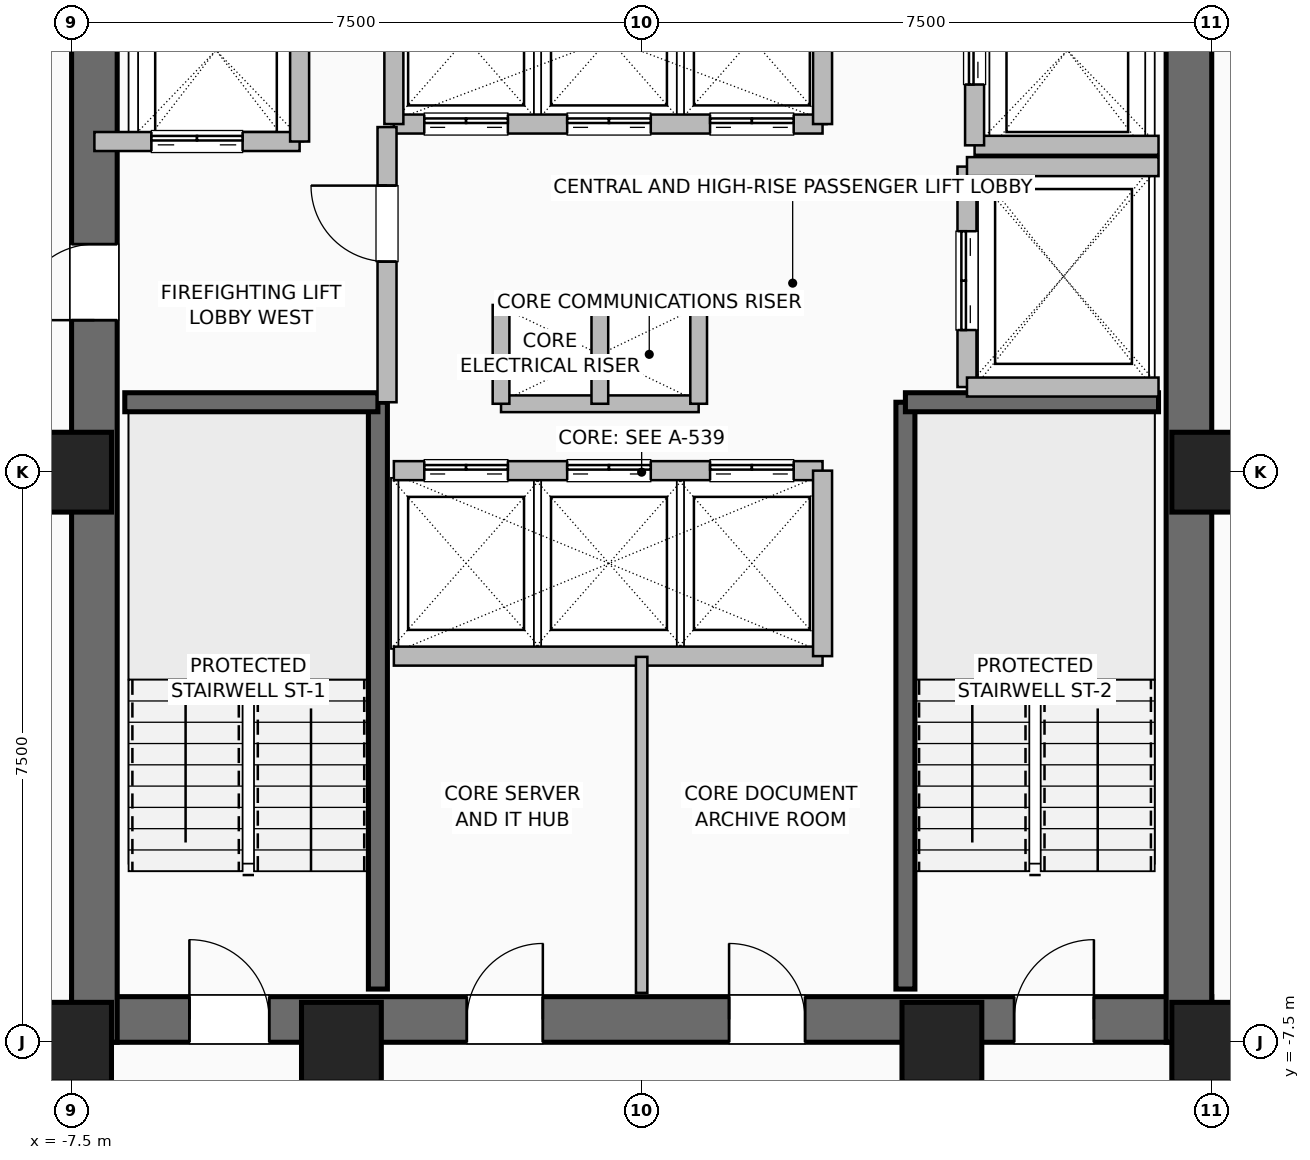
"""IFC4 building model, lengths in metres.
Left out: names, types, materials, properties, quantities, classifications, styles, units other than length and angle.
Written with IfcOpenShell. Run it as: python <this file> out.ifc"""

import sys

from ifc_helpers import new_model, si_unit, direction, frame, frame_2d, origin, origin_2d, place, context, subcontext, project, spatial, rectangle, hollow_rectangle, extrude, element, fill, save


model = new_model("IFC4")
c1 = context("Model", 3, precision=1e-05, world=origin(), true_north=direction((0.0, 1.0)))
c2 = subcontext(c1, "Body", "Model", "MODEL_VIEW")
j1 = project(units=[si_unit("LENGTHUNIT", "METRE"), si_unit("PLANEANGLEUNIT", "RADIAN")], contexts=[c1])
p1 = place(None, origin())
s1 = spatial("IfcSite", under=j1, at=p1, CompositionType="ELEMENT")
p2 = place(p1, origin())
s2 = spatial("IfcBuilding", under=s1, at=p2, CompositionType="ELEMENT")
p3 = place(p2, frame((0.0, 0.0, 148.0)))
s3 = spatial("IfcBuildingStorey", under=s2, at=p3, CompositionType="ELEMENT", Elevation=148.0)
for number, where, z_axis, x_axis in (
    (1, (-7.5, -7.5, 0.0), (0.0, 0.0, 1.0), (1.0, 0.0, 0.0)),
    (2, (-3.95, -7.5, 0.0), (0.0, 0.0, 1.0), (1.0, 0.0, 0.0)),
    (3, (3.95, -7.5, 0.0), (0.0, 0.0, 1.0), (1.0, 0.0, 0.0)),
    (4, (7.5, -7.5, 0.0), (0.0, 0.0, 1.0), (1.0, 0.0, 0.0)),
    (5, (7.5, 0.0, 0.0), (0.0, 0.0, 1.0), (1.0, 0.0, 0.0)),
    (6, (-7.5, 0.0, 0.0), (0.0, 0.0, 1.0), (1.0, 0.0, 0.0)),
):
    element("IfcColumn", number, at=place(p3, frame(where, z_axis=z_axis, x_axis=x_axis)), inside=s3, PredefinedType="COLUMN", context=c2, shape_type="SweptSolid", body=[
        extrude(hollow_rectangle(XDim=1.05, YDim=1.05, WallThickness=0.05, at=origin_2d()), origin(), (0.0, 0.0, 1.0), 3.6),
    ])
p4 = place(p3, frame((-7.5, -7.2, 0.0), z_axis=(0.0, 0.0, 1.0), x_axis=(1.0, 0.0, 0.0)))
e7 = element("IfcWall", 7, at=p4, inside=s3, PredefinedType="SHEAR", context=c2, shape_type="SweptSolid", body=[
    extrude(rectangle(XDim=15.0, YDim=0.6, at=frame_2d((7.5, 0.0))), origin(), (0.0, 0.0, 1.0), 3.36),
])
p5 = place(p4, frame((1.55, 0.0, 0.0)))
e8 = element("IfcOpeningElement", 8, at=p5, cuts=e7, PredefinedType="OPENING", context=c2, shape_type="SweptSolid", body=[
    extrude(rectangle(XDim=1.05, YDim=2.08, at=frame_2d((0.525, 1.04))), frame((0.0, 0.31, 0.0), z_axis=(0.0, -1.0, 0.0), x_axis=(1.0, 0.0, 0.0)), (0.0, 0.0, 1.0), 0.62),
])
p6 = place(p4, frame((12.4, 0.0, 0.0)))
e9 = element("IfcOpeningElement", 9, at=p6, cuts=e7, PredefinedType="OPENING", context=c2, shape_type="SweptSolid", body=[
    extrude(rectangle(XDim=1.05, YDim=2.08, at=frame_2d((0.525, 1.04))), frame((0.0, 0.31, 0.0), z_axis=(0.0, -1.0, 0.0), x_axis=(1.0, 0.0, 0.0)), (0.0, 0.0, 1.0), 0.62),
])
p7 = place(p4, frame((5.2, 0.0, 0.0)))
e10 = element("IfcOpeningElement", 10, at=p7, cuts=e7, PredefinedType="OPENING", context=c2, shape_type="SweptSolid", body=[
    extrude(rectangle(XDim=1.0, YDim=2.08, at=frame_2d((0.5, 1.04))), frame((0.0, 0.31, 0.0), z_axis=(0.0, -1.0, 0.0), x_axis=(1.0, 0.0, 0.0)), (0.0, 0.0, 1.0), 0.62),
])
p8 = place(p4, frame((8.65, 0.0, 0.0)))
e11 = element("IfcOpeningElement", 11, at=p8, cuts=e7, PredefinedType="OPENING", context=c2, shape_type="SweptSolid", body=[
    extrude(rectangle(XDim=1.0, YDim=2.08, at=frame_2d((0.5, 1.04))), frame((0.0, 0.31, 0.0), z_axis=(0.0, -1.0, 0.0), x_axis=(1.0, 0.0, 0.0)), (0.0, 0.0, 1.0), 0.62),
])
p9 = place(p3, frame((-7.2, -7.5, 0.0), z_axis=(0.0, 0.0, 1.0), x_axis=(0.0, 1.0, 0.0)))
e12 = element("IfcWall", 12, at=p9, inside=s3, PredefinedType="SHEAR", context=c2, shape_type="SweptSolid", body=[
    extrude(rectangle(XDim=15.0, YDim=0.6, at=frame_2d((7.5, 0.0))), origin(), (0.0, 0.0, 1.0), 3.36),
])
p10 = place(p9, frame((9.5, 0.0, 0.0)))
e13 = element("IfcOpeningElement", 13, at=p10, cuts=e12, PredefinedType="OPENING", context=c2, shape_type="SweptSolid", body=[
    extrude(rectangle(XDim=1.0, YDim=2.08, at=frame_2d((0.5, 1.04))), frame((0.0, 0.31, 0.0), z_axis=(0.0, -1.0, 0.0), x_axis=(1.0, 0.0, 0.0)), (0.0, 0.0, 1.0), 0.62),
])
p11 = place(p3, frame((7.2, -7.5, 0.0), z_axis=(0.0, 0.0, 1.0), x_axis=(0.0, 1.0, 0.0)))
e14 = element("IfcWall", 14, at=p11, inside=s3, PredefinedType="SHEAR", context=c2, shape_type="SweptSolid", body=[
    extrude(rectangle(XDim=15.0, YDim=0.6, at=frame_2d((7.5, 0.0))), origin(), (0.0, 0.0, 1.0), 3.36),
])
p12 = place(p3, frame((-3.47, -6.8, 0.0), z_axis=(0.0, 0.0, 1.0), x_axis=(0.0, 1.0, 0.0)))
e15 = element("IfcWall", 15, at=p12, inside=s3, PredefinedType="SHEAR", context=c2, shape_type="SweptSolid", body=[
    extrude(rectangle(XDim=7.72, YDim=0.25, at=frame_2d((3.86, 0.0))), origin(), (0.0, 0.0, 1.0), 3.36),
])
p13 = place(p3, frame((-6.8, 0.92, 0.0), z_axis=(0.0, 0.0, 1.0), x_axis=(1.0, 0.0, 0.0)))
e16 = element("IfcWall", 16, at=p13, inside=s3, PredefinedType="SHEAR", context=c2, shape_type="SweptSolid", body=[
    extrude(rectangle(XDim=3.33, YDim=0.25, at=frame_2d((1.665, 0.0))), origin(), (0.0, 0.0, 1.0), 3.36),
])
p14 = place(p3, frame((3.47, -6.8, 0.0), z_axis=(0.0, 0.0, 1.0), x_axis=(0.0, 1.0, 0.0)))
e17 = element("IfcWall", 17, at=p14, inside=s3, PredefinedType="SHEAR", context=c2, shape_type="SweptSolid", body=[
    extrude(rectangle(XDim=7.72, YDim=0.25, at=frame_2d((3.86, 0.0))), origin(), (0.0, 0.0, 1.0), 3.36),
])
p15 = place(p3, frame((3.47, 0.92, 0.0), z_axis=(0.0, 0.0, 1.0), x_axis=(1.0, 0.0, 0.0)))
e18 = element("IfcWall", 18, at=p15, inside=s3, PredefinedType="SHEAR", context=c2, shape_type="SweptSolid", body=[
    extrude(rectangle(XDim=3.33, YDim=0.25, at=frame_2d((1.665, 0.0))), origin(), (0.0, 0.0, 1.0), 3.36),
])
for number, where, z_axis, x_axis in (
    (19, (-1.85, 2.2, 0.0), (0.0, 0.0, 1.0), (1.0, 0.0, 0.0)),
    (20, (-1.85, 0.9, 0.0), (0.0, 0.0, 1.0), (1.0, 0.0, 0.0)),
):
    element("IfcWall", number, at=place(p3, frame(where, z_axis=z_axis, x_axis=x_axis)), inside=s3, PredefinedType="PARTITIONING", context=c2, shape_type="SweptSolid", body=[
        extrude(rectangle(XDim=2.6, YDim=0.22, at=frame_2d((1.3, 0.0))), origin(), (0.0, 0.0, 1.0), 3.36),
    ])
for number, where, z_axis, x_axis in (
    (21, (-0.55, 0.9, 0.0), (0.0, 0.0, 1.0), (0.0, 1.0, 0.0)),
    (22, (0.75, 0.9, 0.0), (0.0, 0.0, 1.0), (0.0, 1.0, 0.0)),
    (23, (-1.85, 0.9, 0.0), (0.0, 0.0, 1.0), (0.0, 1.0, 0.0)),
):
    element("IfcWall", number, at=place(p3, frame(where, z_axis=z_axis, x_axis=x_axis)), inside=s3, PredefinedType="PARTITIONING", context=c2, shape_type="SweptSolid", body=[
        extrude(rectangle(XDim=1.3, YDim=0.22, at=frame_2d((0.65, 0.0))), origin(), (0.0, 0.0, 1.0), 3.36),
    ])
p16 = place(p3, frame((-3.26, 0.02, 0.0), z_axis=(0.0, 0.0, 1.0), x_axis=(1.0, 0.0, 0.0)))
e24 = element("IfcWall", 24, at=p16, inside=s3, PredefinedType="SHEAR", context=c2, shape_type="SweptSolid", body=[
    extrude(rectangle(XDim=5.64, YDim=0.25, at=frame_2d((2.82, 0.0))), origin(), (0.0, 0.0, 1.0), 3.36),
])
p17 = place(p16, frame((0.4, 0.0, 0.0)))
e25 = element("IfcOpeningElement", 25, at=p17, cuts=e24, PredefinedType="OPENING", context=c2, shape_type="SweptSolid", body=[
    extrude(rectangle(XDim=1.1, YDim=2.2, at=frame_2d((0.55, 1.1))), frame((0.0, 0.135, 0.0), z_axis=(0.0, -1.0, 0.0), x_axis=(1.0, 0.0, 0.0)), (0.0, 0.0, 1.0), 0.27),
])
p18 = place(p16, frame((2.28, 0.0, 0.0)))
e26 = element("IfcOpeningElement", 26, at=p18, cuts=e24, PredefinedType="OPENING", context=c2, shape_type="SweptSolid", body=[
    extrude(rectangle(XDim=1.1, YDim=2.2, at=frame_2d((0.55, 1.1))), frame((0.0, 0.135, 0.0), z_axis=(0.0, -1.0, 0.0), x_axis=(1.0, 0.0, 0.0)), (0.0, 0.0, 1.0), 0.27),
])
p19 = place(p16, frame((4.16, 0.0, 0.0)))
e27 = element("IfcOpeningElement", 27, at=p19, cuts=e24, PredefinedType="OPENING", context=c2, shape_type="SweptSolid", body=[
    extrude(rectangle(XDim=1.1, YDim=2.2, at=frame_2d((0.55, 1.1))), frame((0.0, 0.135, 0.0), z_axis=(0.0, -1.0, 0.0), x_axis=(1.0, 0.0, 0.0)), (0.0, 0.0, 1.0), 0.27),
])
p20 = place(p3, frame((-3.26, -2.42, 0.0), z_axis=(0.0, 0.0, 1.0), x_axis=(1.0, 0.0, 0.0)))
e28 = element("IfcWall", 28, at=p20, inside=s3, PredefinedType="SHEAR", context=c2, shape_type="SweptSolid", body=[
    extrude(rectangle(XDim=5.64, YDim=0.25, at=frame_2d((2.82, 0.0))), origin(), (0.0, 0.0, 1.0), 3.36),
])
p21 = place(p3, frame((2.38, -2.42, 0.0), z_axis=(0.0, 0.0, 1.0), x_axis=(0.0, 1.0, 0.0)))
e29 = element("IfcWall", 29, at=p21, inside=s3, PredefinedType="SHEAR", context=c2, shape_type="SweptSolid", body=[
    extrude(rectangle(XDim=2.44, YDim=0.25, at=frame_2d((1.22, 0.0))), origin(), (0.0, 0.0, 1.0), 3.36),
])
p22 = place(p3, frame((-3.26, 4.58, 0.0), z_axis=(0.0, 0.0, 1.0), x_axis=(1.0, 0.0, 0.0)))
e30 = element("IfcWall", 30, at=p22, inside=s3, PredefinedType="SHEAR", context=c2, shape_type="SweptSolid", body=[
    extrude(rectangle(XDim=5.64, YDim=0.25, at=frame_2d((2.82, 0.0))), origin(), (0.0, 0.0, 1.0), 3.36),
])
p23 = place(p22, frame((0.4, 0.0, 0.0)))
e31 = element("IfcOpeningElement", 31, at=p23, cuts=e30, PredefinedType="OPENING", context=c2, shape_type="SweptSolid", body=[
    extrude(rectangle(XDim=1.1, YDim=2.2, at=frame_2d((0.55, 1.1))), frame((0.0, 0.135, 0.0), z_axis=(0.0, -1.0, 0.0), x_axis=(1.0, 0.0, 0.0)), (0.0, 0.0, 1.0), 0.27),
])
p24 = place(p22, frame((2.28, 0.0, 0.0)))
e32 = element("IfcOpeningElement", 32, at=p24, cuts=e30, PredefinedType="OPENING", context=c2, shape_type="SweptSolid", body=[
    extrude(rectangle(XDim=1.1, YDim=2.2, at=frame_2d((0.55, 1.1))), frame((0.0, 0.135, 0.0), z_axis=(0.0, -1.0, 0.0), x_axis=(1.0, 0.0, 0.0)), (0.0, 0.0, 1.0), 0.27),
])
p25 = place(p22, frame((4.16, 0.0, 0.0)))
e33 = element("IfcOpeningElement", 33, at=p25, cuts=e30, PredefinedType="OPENING", context=c2, shape_type="SweptSolid", body=[
    extrude(rectangle(XDim=1.1, YDim=2.2, at=frame_2d((0.55, 1.1))), frame((0.0, 0.135, 0.0), z_axis=(0.0, -1.0, 0.0), x_axis=(1.0, 0.0, 0.0)), (0.0, 0.0, 1.0), 0.27),
])
for number, where, z_axis, x_axis in (
    (34, (-3.26, 4.58, 0.0), (0.0, 0.0, 1.0), (0.0, 1.0, 0.0)),
    (35, (2.38, 4.58, 0.0), (0.0, 0.0, 1.0), (0.0, 1.0, 0.0)),
):
    element("IfcWall", number, at=place(p3, frame(where, z_axis=z_axis, x_axis=x_axis)), inside=s3, PredefinedType="SHEAR", context=c2, shape_type="SweptSolid", body=[
        extrude(rectangle(XDim=2.22, YDim=0.25, at=frame_2d((1.11, 0.0))), origin(), (0.0, 0.0, 1.0), 3.36),
    ])
p26 = place(p3, frame((-7.2, 4.35, 0.0), z_axis=(0.0, 0.0, 1.0), x_axis=(1.0, 0.0, 0.0)))
e36 = element("IfcWall", 36, at=p26, inside=s3, PredefinedType="SHEAR", context=c2, shape_type="SweptSolid", body=[
    extrude(rectangle(XDim=2.7, YDim=0.25, at=frame_2d((1.35, 0.0))), origin(), (0.0, 0.0, 1.0), 3.36),
])
p27 = place(p26, frame((0.75, 0.0, 0.0)))
e37 = element("IfcOpeningElement", 37, at=p27, cuts=e36, PredefinedType="OPENING", context=c2, shape_type="SweptSolid", body=[
    extrude(rectangle(XDim=1.2, YDim=2.2, at=frame_2d((0.6, 1.1))), frame((0.0, 0.135, 0.0), z_axis=(0.0, -1.0, 0.0), x_axis=(1.0, 0.0, 0.0)), (0.0, 0.0, 1.0), 0.27),
])
p28 = place(p3, frame((-4.5, 4.35, 0.0), z_axis=(0.0, 0.0, 1.0), x_axis=(0.0, 1.0, 0.0)))
e38 = element("IfcWall", 38, at=p28, inside=s3, PredefinedType="SHEAR", context=c2, shape_type="SweptSolid", body=[
    extrude(rectangle(XDim=2.85, YDim=0.25, at=frame_2d((1.425, 0.0))), origin(), (0.0, 0.0, 1.0), 3.36),
])
p29 = place(p3, frame((4.38, 4.3, 0.0), z_axis=(0.0, 0.0, 1.0), x_axis=(1.0, 0.0, 0.0)))
e39 = element("IfcWall", 39, at=p29, inside=s3, PredefinedType="SHEAR", context=c2, shape_type="SweptSolid", body=[
    extrude(rectangle(XDim=2.42, YDim=0.25, at=frame_2d((1.21, 0.0))), origin(), (0.0, 0.0, 1.0), 3.36),
])
p30 = place(p3, frame((4.38, 4.3, 0.0), z_axis=(0.0, 0.0, 1.0), x_axis=(0.0, 1.0, 0.0)))
e40 = element("IfcWall", 40, at=p30, inside=s3, PredefinedType="SHEAR", context=c2, shape_type="SweptSolid", body=[
    extrude(rectangle(XDim=2.5, YDim=0.25, at=frame_2d((1.25, 0.0))), origin(), (0.0, 0.0, 1.0), 3.36),
])
p31 = place(p30, frame((0.8, 0.0, 0.0)))
e41 = element("IfcOpeningElement", 41, at=p31, cuts=e40, PredefinedType="OPENING", context=c2, shape_type="SweptSolid", body=[
    extrude(rectangle(XDim=1.2, YDim=2.2, at=frame_2d((0.6, 1.1))), frame((0.0, 0.135, 0.0), z_axis=(0.0, -1.0, 0.0), x_axis=(1.0, 0.0, 0.0)), (0.0, 0.0, 1.0), 0.27),
])
p32 = place(p3, frame((4.28, 1.12, 0.0), z_axis=(0.0, 0.0, 1.0), x_axis=(0.0, 1.0, 0.0)))
e42 = element("IfcWall", 42, at=p32, inside=s3, PredefinedType="SHEAR", context=c2, shape_type="SweptSolid", body=[
    extrude(rectangle(XDim=2.9, YDim=0.25, at=frame_2d((1.45, 0.0))), origin(), (0.0, 0.0, 1.0), 3.36),
])
p33 = place(p32, frame((0.75, 0.0, 0.0)))
e43 = element("IfcOpeningElement", 43, at=p33, cuts=e42, PredefinedType="OPENING", context=c2, shape_type="SweptSolid", body=[
    extrude(rectangle(XDim=1.3, YDim=2.3, at=frame_2d((0.65, 1.15))), frame((0.0, 0.135, 0.0), z_axis=(0.0, -1.0, 0.0), x_axis=(1.0, 0.0, 0.0)), (0.0, 0.0, 1.0), 0.27),
])
for number, where, z_axis, x_axis in (
    (44, (4.28, 1.12, 0.0), (0.0, 0.0, 1.0), (1.0, 0.0, 0.0)),
    (45, (4.28, 4.02, 0.0), (0.0, 0.0, 1.0), (1.0, 0.0, 0.0)),
):
    element("IfcWall", number, at=place(p3, frame(where, z_axis=z_axis, x_axis=x_axis)), inside=s3, PredefinedType="SHEAR", context=c2, shape_type="SweptSolid", body=[
        extrude(rectangle(XDim=2.52, YDim=0.25, at=frame_2d((1.26, 0.0))), origin(), (0.0, 0.0, 1.0), 3.36),
    ])
p34 = place(p3, frame((-3.35, 0.92, 0.0), z_axis=(0.0, 0.0, 1.0), x_axis=(0.0, 1.0, 0.0)))
e46 = element("IfcWall", 46, at=p34, inside=s3, PredefinedType="SHEAR", context=c2, shape_type="SweptSolid", body=[
    extrude(rectangle(XDim=3.62, YDim=0.25, at=frame_2d((1.81, 0.0))), origin(), (0.0, 0.0, 1.0), 3.36),
])
p35 = place(p34, frame((1.85, 0.0, 0.0)))
e47 = element("IfcOpeningElement", 47, at=p35, cuts=e46, PredefinedType="OPENING", context=c2, shape_type="SweptSolid", body=[
    extrude(rectangle(XDim=1.0, YDim=2.08, at=frame_2d((0.5, 1.04))), frame((0.0, 0.135, 0.0), z_axis=(0.0, -1.0, 0.0), x_axis=(1.0, 0.0, 0.0)), (0.0, 0.0, 1.0), 0.27),
])
p36 = place(p3, frame((0.0, -6.85, 0.0), z_axis=(0.0, 0.0, 1.0), x_axis=(0.0, 1.0, 0.0)))
e48 = element("IfcWall", 48, at=p36, inside=s3, PredefinedType="PARTITIONING", context=c2, shape_type="SweptSolid", body=[
    extrude(rectangle(XDim=4.42, YDim=0.15, at=frame_2d((2.21, 0.0))), origin(), (0.0, 0.0, 1.0), 3.36),
])
p37 = place(p3, frame((7.45, -7.48, 0.0), z_axis=(0.0, 0.0, 1.0), x_axis=(1.0, 0.0, 0.0)))
e49 = element("IfcWall", 49, at=p37, inside=s3, PredefinedType="PARTITIONING", context=c2, shape_type="SweptSolid", body=[
    extrude(rectangle(XDim=0.95, YDim=0.15, at=frame_2d((0.475, 0.0))), origin(), (0.0, 0.0, 1.0), 3.36),
])
p38 = place(p5, origin())
e50 = element("IfcDoor", 50, at=p38, inside=s3, OperationType="SINGLE_SWING_LEFT", PredefinedType="DOOR", context=c2, shape_type="SweptSolid", body=[
    extrude(rectangle(XDim=1.05, YDim=2.08, at=frame_2d((0.525, 1.04))), frame((0.0, 0.025, 0.0), z_axis=(0.0, -1.0, 0.0), x_axis=(1.0, 0.0, 0.0)), (0.0, 0.0, 1.0), 0.05),
])
fill(e8, e50)
p39 = place(p6, origin())
e51 = element("IfcDoor", 51, at=p39, inside=s3, OperationType="SINGLE_SWING_RIGHT", PredefinedType="DOOR", context=c2, shape_type="SweptSolid", body=[
    extrude(rectangle(XDim=1.05, YDim=2.08, at=frame_2d((0.525, 1.04))), frame((0.0, 0.025, 0.0), z_axis=(0.0, -1.0, 0.0), x_axis=(1.0, 0.0, 0.0)), (0.0, 0.0, 1.0), 0.05),
])
fill(e9, e51)
p40 = place(p10, origin())
e52 = element("IfcDoor", 52, at=p40, inside=s3, OperationType="SINGLE_SWING_LEFT", PredefinedType="DOOR", context=c2, shape_type="SweptSolid", body=[
    extrude(rectangle(XDim=1.0, YDim=2.08, at=frame_2d((0.5, 1.04))), frame((0.0, 0.025, 0.0), z_axis=(0.0, -1.0, 0.0), x_axis=(1.0, 0.0, 0.0)), (0.0, 0.0, 1.0), 0.05),
])
fill(e13, e52)
p41 = place(p7, origin())
e53 = element("IfcDoor", 53, at=p41, inside=s3, OperationType="SINGLE_SWING_RIGHT", PredefinedType="DOOR", context=c2, shape_type="SweptSolid", body=[
    extrude(rectangle(XDim=1.0, YDim=2.08, at=frame_2d((0.5, 1.04))), frame((0.0, 0.025, 0.0), z_axis=(0.0, -1.0, 0.0), x_axis=(1.0, 0.0, 0.0)), (0.0, 0.0, 1.0), 0.05),
])
fill(e10, e53)
p42 = place(p8, origin())
e54 = element("IfcDoor", 54, at=p42, inside=s3, OperationType="SINGLE_SWING_LEFT", PredefinedType="DOOR", context=c2, shape_type="SweptSolid", body=[
    extrude(rectangle(XDim=1.0, YDim=2.08, at=frame_2d((0.5, 1.04))), frame((0.0, 0.025, 0.0), z_axis=(0.0, -1.0, 0.0), x_axis=(1.0, 0.0, 0.0)), (0.0, 0.0, 1.0), 0.05),
])
fill(e11, e54)
p43 = place(p17, origin())
e55 = element("IfcDoor", 55, at=p43, inside=s3, OperationType="DOUBLE_DOOR_SLIDING", PredefinedType="DOOR", context=c2, shape_type="SweptSolid", body=[
    extrude(rectangle(XDim=1.1, YDim=2.2, at=frame_2d((0.55, 1.1))), frame((0.0, 0.025, 0.0), z_axis=(0.0, -1.0, 0.0), x_axis=(1.0, 0.0, 0.0)), (0.0, 0.0, 1.0), 0.05),
])
fill(e25, e55)
p44 = place(p18, origin())
e56 = element("IfcDoor", 56, at=p44, inside=s3, OperationType="DOUBLE_DOOR_SLIDING", PredefinedType="DOOR", context=c2, shape_type="SweptSolid", body=[
    extrude(rectangle(XDim=1.1, YDim=2.2, at=frame_2d((0.55, 1.1))), frame((0.0, 0.025, 0.0), z_axis=(0.0, -1.0, 0.0), x_axis=(1.0, 0.0, 0.0)), (0.0, 0.0, 1.0), 0.05),
])
fill(e26, e56)
p45 = place(p19, origin())
e57 = element("IfcDoor", 57, at=p45, inside=s3, OperationType="DOUBLE_DOOR_SLIDING", PredefinedType="DOOR", context=c2, shape_type="SweptSolid", body=[
    extrude(rectangle(XDim=1.1, YDim=2.2, at=frame_2d((0.55, 1.1))), frame((0.0, 0.025, 0.0), z_axis=(0.0, -1.0, 0.0), x_axis=(1.0, 0.0, 0.0)), (0.0, 0.0, 1.0), 0.05),
])
fill(e27, e57)
p46 = place(p23, origin())
e58 = element("IfcDoor", 58, at=p46, inside=s3, OperationType="DOUBLE_DOOR_SLIDING", PredefinedType="DOOR", context=c2, shape_type="SweptSolid", body=[
    extrude(rectangle(XDim=1.1, YDim=2.2, at=frame_2d((0.55, 1.1))), frame((0.0, 0.025, 0.0), z_axis=(0.0, -1.0, 0.0), x_axis=(1.0, 0.0, 0.0)), (0.0, 0.0, 1.0), 0.05),
])
fill(e31, e58)
p47 = place(p24, origin())
e59 = element("IfcDoor", 59, at=p47, inside=s3, OperationType="DOUBLE_DOOR_SLIDING", PredefinedType="DOOR", context=c2, shape_type="SweptSolid", body=[
    extrude(rectangle(XDim=1.1, YDim=2.2, at=frame_2d((0.55, 1.1))), frame((0.0, 0.025, 0.0), z_axis=(0.0, -1.0, 0.0), x_axis=(1.0, 0.0, 0.0)), (0.0, 0.0, 1.0), 0.05),
])
fill(e32, e59)
p48 = place(p25, origin())
e60 = element("IfcDoor", 60, at=p48, inside=s3, OperationType="DOUBLE_DOOR_SLIDING", PredefinedType="DOOR", context=c2, shape_type="SweptSolid", body=[
    extrude(rectangle(XDim=1.1, YDim=2.2, at=frame_2d((0.55, 1.1))), frame((0.0, 0.025, 0.0), z_axis=(0.0, -1.0, 0.0), x_axis=(1.0, 0.0, 0.0)), (0.0, 0.0, 1.0), 0.05),
])
fill(e33, e60)
p49 = place(p27, origin())
e61 = element("IfcDoor", 61, at=p49, inside=s3, OperationType="DOUBLE_DOOR_SLIDING", PredefinedType="DOOR", context=c2, shape_type="SweptSolid", body=[
    extrude(rectangle(XDim=1.2, YDim=2.2, at=frame_2d((0.6, 1.1))), frame((0.0, 0.025, 0.0), z_axis=(0.0, -1.0, 0.0), x_axis=(1.0, 0.0, 0.0)), (0.0, 0.0, 1.0), 0.05),
])
fill(e37, e61)
p50 = place(p31, origin())
e62 = element("IfcDoor", 62, at=p50, inside=s3, OperationType="DOUBLE_DOOR_SLIDING", PredefinedType="DOOR", context=c2, shape_type="SweptSolid", body=[
    extrude(rectangle(XDim=1.2, YDim=2.2, at=frame_2d((0.6, 1.1))), frame((0.0, 0.025, 0.0), z_axis=(0.0, -1.0, 0.0), x_axis=(1.0, 0.0, 0.0)), (0.0, 0.0, 1.0), 0.05),
])
fill(e41, e62)
p51 = place(p33, origin())
e63 = element("IfcDoor", 63, at=p51, inside=s3, OperationType="DOUBLE_DOOR_SLIDING", PredefinedType="DOOR", context=c2, shape_type="SweptSolid", body=[
    extrude(rectangle(XDim=1.3, YDim=2.3, at=frame_2d((0.65, 1.15))), frame((0.0, 0.025, 0.0), z_axis=(0.0, -1.0, 0.0), x_axis=(1.0, 0.0, 0.0)), (0.0, 0.0, 1.0), 0.05),
])
fill(e43, e63)
p52 = place(p35, origin())
e64 = element("IfcDoor", 64, at=p52, inside=s3, OperationType="SINGLE_SWING_RIGHT", PredefinedType="DOOR", context=c2, shape_type="SweptSolid", body=[
    extrude(rectangle(XDim=1.0, YDim=2.08, at=frame_2d((0.5, 1.04))), frame((0.0, 0.025, 0.0), z_axis=(0.0, -1.0, 0.0), x_axis=(1.0, 0.0, 0.0)), (0.0, 0.0, 1.0), 0.05),
])
fill(e47, e64)
save(model, sys.argv[1])
